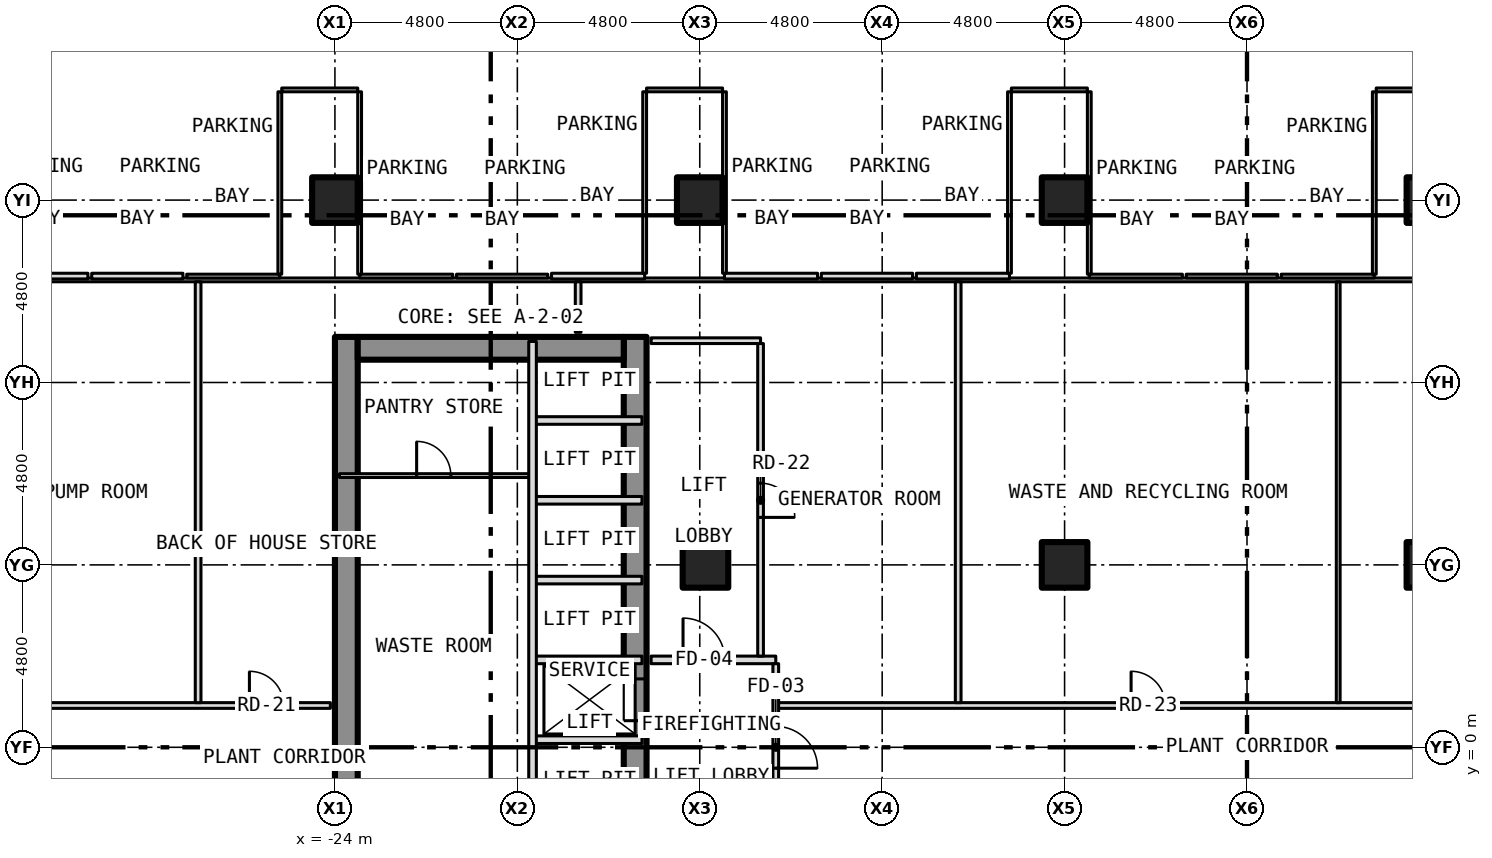
"""IFC4 building model, lengths in metres.
Left out: names, types, materials, properties, quantities, classifications, styles, units other than length and angle.
Written with IfcOpenShell. Run it as: python <this file> out.ifc"""

import sys

from ifc_helpers import new_model, si_unit, direction, frame, frame_2d, origin, origin_2d, place, context, subcontext, project, spatial, rectangle, hollow_rectangle, extrude, element, fill, save


model = new_model("IFC4")
c1 = context("Model", 3, precision=1e-05, world=origin(), true_north=direction((0.0, 1.0)))
c2 = subcontext(c1, "Body", "Model", "MODEL_VIEW")
j1 = project(units=[si_unit("LENGTHUNIT", "METRE"), si_unit("PLANEANGLEUNIT", "RADIAN")], contexts=[c1])
p1 = place(None, origin())
s1 = spatial("IfcSite", under=j1, at=p1, CompositionType="ELEMENT")
p2 = place(p1, origin())
s2 = spatial("IfcBuilding", under=s1, at=p2, CompositionType="ELEMENT")
p3 = place(p2, frame((0.0, 0.0, -5.0)))
s3 = spatial("IfcBuildingStorey", under=s2, at=p3, CompositionType="ELEMENT", Elevation=-5.0)
for number, where, z_axis, x_axis in (
    (1, (-24.0, 14.4, -0.3), (0.0, 0.0, 1.0), (1.0, 0.0, 0.0)),
    (2, (-14.25, 4.8, -0.3), (0.0, 0.0, 1.0), (1.0, 0.0, 0.0)),
    (3, (-14.4, 14.4, -0.3), (0.0, 0.0, 1.0), (1.0, 0.0, 0.0)),
    (4, (-4.8, 4.8, -0.3), (0.0, 0.0, 1.0), (1.0, 0.0, 0.0)),
    (5, (-4.8, 14.4, -0.3), (0.0, 0.0, 1.0), (1.0, 0.0, 0.0)),
    (6, (4.8, 4.8, -0.3), (0.0, 0.0, 1.0), (1.0, 0.0, 0.0)),
    (7, (4.8, 14.4, -0.3), (0.0, 0.0, 1.0), (1.0, 0.0, 0.0)),
):
    element("IfcColumn", number, at=place(p3, frame(where, z_axis=z_axis, x_axis=x_axis)), inside=s3, PredefinedType="COLUMN", context=c2, shape_type="SweptSolid", body=[
        extrude(hollow_rectangle(XDim=1.2, YDim=1.2, WallThickness=0.07, at=origin_2d()), origin(), (0.0, 0.0, 1.0), 5.0),
    ])
p4 = place(p3, frame((-16.1, -10.8, 0.0), z_axis=(0.0, 0.0, 1.0), x_axis=(0.0, 1.0, 0.0)))
e8 = element("IfcWall", 8, at=p4, inside=s3, PredefinedType="SHEAR", context=c2, shape_type="SweptSolid", body=[
    extrude(rectangle(XDim=21.6, YDim=0.6, at=frame_2d((10.8, 0.0))), origin(), (0.0, 0.0, 1.0), 4.7),
])
p5 = place(p4, frame((11.5, 0.0, 0.0)))
e9 = element("IfcOpeningElement", 9, at=p5, cuts=e8, PredefinedType="OPENING", context=c2, shape_type="SweptSolid", body=[
    extrude(rectangle(XDim=1.1, YDim=2.1, at=frame_2d((0.55, 1.05))), frame((0.0, 0.312, 0.0), z_axis=(0.0, -1.0, 0.0), x_axis=(1.0, 0.0, 0.0)), (0.0, 0.0, 1.0), 0.624),
])
p6 = place(p4, frame((0.758, 0.0, 0.0)))
e10 = element("IfcOpeningElement", 10, at=p6, cuts=e8, PredefinedType="OPENING", context=c2, shape_type="SweptSolid", body=[
    extrude(rectangle(XDim=1.1, YDim=2.1, at=frame_2d((0.55, 1.05))), frame((0.0, 0.312, 0.0), z_axis=(0.0, -1.0, 0.0), x_axis=(1.0, 0.0, 0.0)), (0.0, 0.0, 1.0), 0.624),
])
p7 = place(p4, frame((7.5, 0.0, 0.0)))
e11 = element("IfcOpeningElement", 11, at=p7, cuts=e8, PredefinedType="OPENING", context=c2, shape_type="SweptSolid", body=[
    extrude(rectangle(XDim=1.1, YDim=2.1, at=frame_2d((0.55, 1.05))), frame((0.0, 0.312, 0.0), z_axis=(0.0, -1.0, 0.0), x_axis=(1.0, 0.0, 0.0)), (0.0, 0.0, 1.0), 0.624),
])
p8 = place(p3, frame((-23.7, -10.8, 0.0), z_axis=(0.0, 0.0, 1.0), x_axis=(0.0, 1.0, 0.0)))
e12 = element("IfcWall", 12, at=p8, inside=s3, PredefinedType="SHEAR", context=c2, shape_type="SweptSolid", body=[
    extrude(rectangle(XDim=21.6, YDim=0.6, at=frame_2d((10.8, 0.0))), origin(), (0.0, 0.0, 1.0), 4.7),
])
p9 = place(p3, frame((-23.4, 10.5, 0.0), z_axis=(0.0, 0.0, 1.0), x_axis=(1.0, 0.0, 0.0)))
e13 = element("IfcWall", 13, at=p9, inside=s3, PredefinedType="SHEAR", context=c2, shape_type="SweptSolid", body=[
    extrude(rectangle(XDim=7.0, YDim=0.6, at=frame_2d((3.5, 0.0))), origin(), (0.0, 0.0, 1.0), 4.7),
])
p10 = place(p3, frame((-18.8, 0.2, 0.0), z_axis=(0.0, 0.0, 1.0), x_axis=(1.0, 0.0, 0.0)))
e14 = element("IfcWall", 14, at=p10, inside=s3, PredefinedType="PARTITIONING", context=c2, shape_type="SweptSolid", body=[
    extrude(rectangle(XDim=2.88, YDim=0.2, at=frame_2d((1.44, 0.0))), origin(), (0.0, 0.0, 1.0), 4.7),
])
p11 = place(p3, frame((-37.6, 1.1, 0.0), z_axis=(0.0, 0.0, 1.0), x_axis=(1.0, 0.0, 0.0)))
e15 = element("IfcWall", 15, at=p11, inside=s3, PredefinedType="PARTITIONING", context=c2, shape_type="SweptSolid", body=[
    extrude(rectangle(XDim=13.48, YDim=0.15, at=frame_2d((6.74, 0.0))), origin(), (0.0, 0.0, 1.0), 4.7),
])
p12 = place(p11, frame((4.55, 0.0, 0.0)))
e16 = element("IfcOpeningElement", 16, at=p12, cuts=e15, PredefinedType="OPENING", context=c2, shape_type="SweptSolid", body=[
    extrude(rectangle(XDim=0.9, YDim=2.1, at=frame_2d((0.45, 1.05))), frame((0.0, 0.087, 0.0), z_axis=(0.0, -1.0, 0.0), x_axis=(1.0, 0.0, 0.0)), (0.0, 0.0, 1.0), 0.174),
])
p13 = place(p11, frame((11.35, 0.0, 0.0)))
e17 = element("IfcOpeningElement", 17, at=p13, cuts=e15, PredefinedType="OPENING", context=c2, shape_type="SweptSolid", body=[
    extrude(rectangle(XDim=0.9, YDim=2.1, at=frame_2d((0.45, 1.05))), frame((0.0, 0.087, 0.0), z_axis=(0.0, -1.0, 0.0), x_axis=(1.0, 0.0, 0.0)), (0.0, 0.0, 1.0), 0.174),
])
p14 = place(p3, frame((-12.4, 1.1, 0.0), z_axis=(0.0, 0.0, 1.0), x_axis=(1.0, 0.0, 0.0)))
e18 = element("IfcWall", 18, at=p14, inside=s3, PredefinedType="PARTITIONING", context=c2, shape_type="SweptSolid", body=[
    extrude(rectangle(XDim=24.8, YDim=0.15, at=frame_2d((12.4, 0.0))), origin(), (0.0, 0.0, 1.0), 4.7),
])
p15 = place(p14, frame((9.35, 0.0, 0.0)))
e19 = element("IfcOpeningElement", 19, at=p15, cuts=e18, PredefinedType="OPENING", context=c2, shape_type="SweptSolid", body=[
    extrude(rectangle(XDim=0.9, YDim=2.1, at=frame_2d((0.45, 1.05))), frame((0.0, 0.087, 0.0), z_axis=(0.0, -1.0, 0.0), x_axis=(1.0, 0.0, 0.0)), (0.0, 0.0, 1.0), 0.174),
])
p16 = place(p14, frame((19.35, 0.0, 0.0)))
e20 = element("IfcOpeningElement", 20, at=p16, cuts=e18, PredefinedType="OPENING", context=c2, shape_type="SweptSolid", body=[
    extrude(rectangle(XDim=0.9, YDim=2.1, at=frame_2d((0.45, 1.05))), frame((0.0, 0.087, 0.0), z_axis=(0.0, -1.0, 0.0), x_axis=(1.0, 0.0, 0.0)), (0.0, 0.0, 1.0), 0.174),
])
p17 = place(p3, frame((-18.8, 2.3, 0.0), z_axis=(0.0, 0.0, 1.0), x_axis=(1.0, 0.0, 0.0)))
e21 = element("IfcWall", 21, at=p17, inside=s3, PredefinedType="PARTITIONING", context=c2, shape_type="SweptSolid", body=[
    extrude(rectangle(XDim=2.88, YDim=0.2, at=frame_2d((1.44, 0.0))), origin(), (0.0, 0.0, 1.0), 4.7),
])
p18 = place(p3, frame((-15.68, 2.3, 0.0), z_axis=(0.0, 0.0, 1.0), x_axis=(1.0, 0.0, 0.0)))
e22 = element("IfcWall", 22, at=p18, inside=s3, PredefinedType="PARTITIONING", context=c2, shape_type="SweptSolid", body=[
    extrude(rectangle(XDim=3.28, YDim=0.2, at=frame_2d((1.64, 0.0))), origin(), (0.0, 0.0, 1.0), 4.7),
])
p19 = place(p18, frame((0.84, 0.0, 0.0)))
e23 = element("IfcOpeningElement", 23, at=p19, cuts=e22, PredefinedType="OPENING", context=c2, shape_type="SweptSolid", body=[
    extrude(rectangle(XDim=1.1, YDim=2.1, at=frame_2d((0.55, 1.05))), frame((0.0, 0.112, 0.0), z_axis=(0.0, -1.0, 0.0), x_axis=(1.0, 0.0, 0.0)), (0.0, 0.0, 1.0), 0.224),
])
for number, where, z_axis, x_axis in (
    (24, (-18.8, 4.4, 0.0), (0.0, 0.0, 1.0), (1.0, 0.0, 0.0)),
    (25, (-18.8, 6.5, 0.0), (0.0, 0.0, 1.0), (1.0, 0.0, 0.0)),
):
    element("IfcWall", number, at=place(p3, frame(where, z_axis=z_axis, x_axis=x_axis)), inside=s3, PredefinedType="PARTITIONING", context=c2, shape_type="SweptSolid", body=[
        extrude(rectangle(XDim=2.88, YDim=0.2, at=frame_2d((1.44, 0.0))), origin(), (0.0, 0.0, 1.0), 4.7),
    ])
p20 = place(p3, frame((-23.88, 7.15, 0.0), z_axis=(0.0, 0.0, 1.0), x_axis=(1.0, 0.0, 0.0)))
e26 = element("IfcWall", 26, at=p20, inside=s3, PredefinedType="PARTITIONING", context=c2, shape_type="SweptSolid", body=[
    extrude(rectangle(XDim=5.08, YDim=0.1, at=frame_2d((2.54, 0.0))), origin(), (0.0, 0.0, 1.0), 4.7),
])
p21 = place(p20, frame((2.03, 0.0, 0.0)))
e27 = element("IfcOpeningElement", 27, at=p21, cuts=e26, PredefinedType="OPENING", context=c2, shape_type="SweptSolid", body=[
    extrude(rectangle(XDim=0.9, YDim=2.1, at=frame_2d((0.45, 1.05))), frame((0.0, 0.062, 0.0), z_axis=(0.0, -1.0, 0.0), x_axis=(1.0, 0.0, 0.0)), (0.0, 0.0, 1.0), 0.124),
])
p22 = place(p3, frame((-18.8, 8.6, 0.0), z_axis=(0.0, 0.0, 1.0), x_axis=(1.0, 0.0, 0.0)))
e28 = element("IfcWall", 28, at=p22, inside=s3, PredefinedType="PARTITIONING", context=c2, shape_type="SweptSolid", body=[
    extrude(rectangle(XDim=2.88, YDim=0.2, at=frame_2d((1.44, 0.0))), origin(), (0.0, 0.0, 1.0), 4.7),
])
p23 = place(p3, frame((-15.68, 10.7, 0.0), z_axis=(0.0, 0.0, 1.0), x_axis=(1.0, 0.0, 0.0)))
e29 = element("IfcWall", 29, at=p23, inside=s3, PredefinedType="PARTITIONING", context=c2, shape_type="SweptSolid", body=[
    extrude(rectangle(XDim=2.88, YDim=0.15, at=frame_2d((1.44, 0.0))), origin(), (0.0, 0.0, 1.0), 4.7),
])
p24 = place(p3, frame((-37.6, 12.3, 0.0), z_axis=(0.0, 0.0, 1.0), x_axis=(1.0, 0.0, 0.0)))
e30 = element("IfcWall", 30, at=p24, inside=s3, PredefinedType="PARTITIONING", context=c2, shape_type="SweptSolid", body=[
    extrude(rectangle(XDim=70.0, YDim=0.1, at=frame_2d((35.0, 0.0))), origin(), (0.0, 0.0, 1.0), 4.7),
])
p25 = place(p3, frame((-32.95, 12.4, 0.0), z_axis=(0.0, 0.0, 1.0), x_axis=(1.0, 0.0, 0.0)))
e31 = element("IfcWall", 31, at=p25, inside=s3, PredefinedType="PARTITIONING", context=c2, shape_type="SweptSolid", body=[
    extrude(rectangle(XDim=2.45, YDim=0.15, at=frame_2d((1.225, 0.0))), origin(), (0.0, 0.0, 1.0), 4.7),
])
p26 = place(p3, frame((-30.4, 12.4, 0.0), z_axis=(0.0, 0.0, 1.0), x_axis=(1.0, 0.0, 0.0)))
e32 = element("IfcWall", 32, at=p26, inside=s3, PredefinedType="PARTITIONING", context=c2, shape_type="SweptSolid", body=[
    extrude(rectangle(XDim=2.4, YDim=0.15, at=frame_2d((1.2, 0.0))), origin(), (0.0, 0.0, 1.0), 4.7),
])
p27 = place(p3, frame((-27.9, 12.4, 0.0), z_axis=(0.0, 0.0, 1.0), x_axis=(1.0, 0.0, 0.0)))
e33 = element("IfcWall", 33, at=p27, inside=s3, PredefinedType="PARTITIONING", context=c2, shape_type="SweptSolid", body=[
    extrude(rectangle(XDim=2.45, YDim=0.1, at=frame_2d((1.225, 0.0))), origin(), (0.0, 0.0, 1.0), 4.7),
])
p28 = place(p3, frame((-23.35, 12.4, 0.0), z_axis=(0.0, 0.0, 1.0), x_axis=(1.0, 0.0, 0.0)))
e34 = element("IfcWall", 34, at=p28, inside=s3, PredefinedType="PARTITIONING", context=c2, shape_type="SweptSolid", body=[
    extrude(rectangle(XDim=2.45, YDim=0.1, at=frame_2d((1.225, 0.0))), origin(), (0.0, 0.0, 1.0), 4.7),
])
p29 = place(p3, frame((-20.8, 12.4, 0.0), z_axis=(0.0, 0.0, 1.0), x_axis=(1.0, 0.0, 0.0)))
e35 = element("IfcWall", 35, at=p29, inside=s3, PredefinedType="PARTITIONING", context=c2, shape_type="SweptSolid", body=[
    extrude(rectangle(XDim=2.4, YDim=0.1, at=frame_2d((1.2, 0.0))), origin(), (0.0, 0.0, 1.0), 4.7),
])
for number, where, z_axis, x_axis in (
    (36, (-18.3, 12.4, 0.0), (0.0, 0.0, 1.0), (1.0, 0.0, 0.0)),
    (37, (-13.75, 12.4, 0.0), (0.0, 0.0, 1.0), (1.0, 0.0, 0.0)),
):
    element("IfcWall", number, at=place(p3, frame(where, z_axis=z_axis, x_axis=x_axis)), inside=s3, PredefinedType="PARTITIONING", context=c2, shape_type="SweptSolid", body=[
        extrude(rectangle(XDim=2.45, YDim=0.15, at=frame_2d((1.225, 0.0))), origin(), (0.0, 0.0, 1.0), 4.7),
    ])
p30 = place(p3, frame((-11.2, 12.4, 0.0), z_axis=(0.0, 0.0, 1.0), x_axis=(1.0, 0.0, 0.0)))
e38 = element("IfcWall", 38, at=p30, inside=s3, PredefinedType="PARTITIONING", context=c2, shape_type="SweptSolid", body=[
    extrude(rectangle(XDim=2.4, YDim=0.15, at=frame_2d((1.2, 0.0))), origin(), (0.0, 0.0, 1.0), 4.7),
])
p31 = place(p3, frame((-8.7, 12.4, 0.0), z_axis=(0.0, 0.0, 1.0), x_axis=(1.0, 0.0, 0.0)))
e39 = element("IfcWall", 39, at=p31, inside=s3, PredefinedType="PARTITIONING", context=c2, shape_type="SweptSolid", body=[
    extrude(rectangle(XDim=2.45, YDim=0.15, at=frame_2d((1.225, 0.0))), origin(), (0.0, 0.0, 1.0), 4.7),
])
p32 = place(p3, frame((-4.15, 12.4, 0.0), z_axis=(0.0, 0.0, 1.0), x_axis=(1.0, 0.0, 0.0)))
e40 = element("IfcWall", 40, at=p32, inside=s3, PredefinedType="PARTITIONING", context=c2, shape_type="SweptSolid", body=[
    extrude(rectangle(XDim=2.45, YDim=0.1, at=frame_2d((1.225, 0.0))), origin(), (0.0, 0.0, 1.0), 4.7),
])
p33 = place(p3, frame((-1.6, 12.4, 0.0), z_axis=(0.0, 0.0, 1.0), x_axis=(1.0, 0.0, 0.0)))
e41 = element("IfcWall", 41, at=p33, inside=s3, PredefinedType="PARTITIONING", context=c2, shape_type="SweptSolid", body=[
    extrude(rectangle(XDim=2.4, YDim=0.1, at=frame_2d((1.2, 0.0))), origin(), (0.0, 0.0, 1.0), 4.7),
])
p34 = place(p3, frame((0.9, 12.4, 0.0), z_axis=(0.0, 0.0, 1.0), x_axis=(1.0, 0.0, 0.0)))
e42 = element("IfcWall", 42, at=p34, inside=s3, PredefinedType="PARTITIONING", context=c2, shape_type="SweptSolid", body=[
    extrude(rectangle(XDim=2.45, YDim=0.1, at=frame_2d((1.225, 0.0))), origin(), (0.0, 0.0, 1.0), 4.7),
])
for number, where, z_axis, x_axis in (
    (43, (-25.4, 17.3, 0.0), (0.0, 0.0, 1.0), (1.0, 0.0, 0.0)),
    (44, (-15.8, 17.3, 0.0), (0.0, 0.0, 1.0), (1.0, 0.0, 0.0)),
    (45, (-6.2, 17.3, 0.0), (0.0, 0.0, 1.0), (1.0, 0.0, 0.0)),
    (46, (3.4, 17.3, 0.0), (0.0, 0.0, 1.0), (1.0, 0.0, 0.0)),
):
    element("IfcWall", number, at=place(p3, frame(where, z_axis=z_axis, x_axis=x_axis)), inside=s3, PredefinedType="PARTITIONING", context=c2, shape_type="SweptSolid", body=[
        extrude(rectangle(XDim=2.0, YDim=0.1, at=frame_2d((1.0, 0.0))), origin(), (0.0, 0.0, 1.0), 4.7),
    ])
p35 = place(p3, frame((-27.6, 1.175, 0.0), z_axis=(0.0, 0.0, 1.0), x_axis=(0.0, 1.0, 0.0)))
e47 = element("IfcWall", 47, at=p35, inside=s3, PredefinedType="PARTITIONING", context=c2, shape_type="SweptSolid", body=[
    extrude(rectangle(XDim=11.075, YDim=0.15, at=frame_2d((5.538, 0.0))), origin(), (0.0, 0.0, 1.0), 4.7),
])
for number, where, z_axis, x_axis in (
    (48, (-25.45, 12.45, 0.0), (0.0, 0.0, 1.0), (0.0, 1.0, 0.0)),
    (49, (-23.35, 12.45, 0.0), (0.0, 0.0, 1.0), (0.0, 1.0, 0.0)),
):
    element("IfcWall", number, at=place(p3, frame(where, z_axis=z_axis, x_axis=x_axis)), inside=s3, PredefinedType="PARTITIONING", context=c2, shape_type="SweptSolid", body=[
        extrude(rectangle(XDim=4.8, YDim=0.1, at=frame_2d((2.4, 0.0))), origin(), (0.0, 0.0, 1.0), 4.7),
    ])
p36 = place(p3, frame((-18.8, -1.8, 0.0), z_axis=(0.0, 0.0, 1.0), x_axis=(0.0, 1.0, 0.0)))
e50 = element("IfcWall", 50, at=p36, inside=s3, PredefinedType="PARTITIONING", context=c2, shape_type="SweptSolid", body=[
    extrude(rectangle(XDim=12.48, YDim=0.2, at=frame_2d((6.24, 0.0))), origin(), (0.0, 0.0, 1.0), 4.7),
])
p37 = place(p3, frame((-17.6, 10.92, 0.0), z_axis=(0.0, 0.0, 1.0), x_axis=(0.0, 1.0, 0.0)))
e51 = element("IfcWall", 51, at=p37, inside=s3, PredefinedType="PARTITIONING", context=c2, shape_type="SweptSolid", body=[
    extrude(rectangle(XDim=1.33, YDim=0.15, at=frame_2d((0.665, 0.0))), origin(), (0.0, 0.0, 1.0), 4.7),
])
for number, where, z_axis, x_axis in (
    (52, (-15.85, 12.475, 0.0), (0.0, 0.0, 1.0), (0.0, 1.0, 0.0)),
    (53, (-13.75, 12.475, 0.0), (0.0, 0.0, 1.0), (0.0, 1.0, 0.0)),
):
    element("IfcWall", number, at=place(p3, frame(where, z_axis=z_axis, x_axis=x_axis)), inside=s3, PredefinedType="PARTITIONING", context=c2, shape_type="SweptSolid", body=[
        extrude(rectangle(XDim=4.775, YDim=0.1, at=frame_2d((2.387, 0.0))), origin(), (0.0, 0.0, 1.0), 4.7),
    ])
p38 = place(p3, frame((-12.8, 2.4, 0.0), z_axis=(0.0, 0.0, 1.0), x_axis=(0.0, 1.0, 0.0)))
e54 = element("IfcWall", 54, at=p38, inside=s3, PredefinedType="PARTITIONING", context=c2, shape_type="SweptSolid", body=[
    extrude(rectangle(XDim=8.225, YDim=0.15, at=frame_2d((4.113, 0.0))), origin(), (0.0, 0.0, 1.0), 4.7),
])
p39 = place(p38, frame((3.65, 0.0, 0.0)))
e55 = element("IfcOpeningElement", 55, at=p39, cuts=e54, PredefinedType="OPENING", context=c2, shape_type="SweptSolid", body=[
    extrude(rectangle(XDim=0.9, YDim=2.1, at=frame_2d((0.45, 1.05))), frame((0.0, 0.087, 0.0), z_axis=(0.0, -1.0, 0.0), x_axis=(1.0, 0.0, 0.0)), (0.0, 0.0, 1.0), 0.174),
])
p40 = place(p3, frame((-12.4, -10.725, 0.0), z_axis=(0.0, 0.0, 1.0), x_axis=(0.0, 1.0, 0.0)))
e56 = element("IfcWall", 56, at=p40, inside=s3, PredefinedType="PARTITIONING", context=c2, shape_type="SweptSolid", body=[
    extrude(rectangle(XDim=12.925, YDim=0.15, at=frame_2d((6.462, 0.0))), origin(), (0.0, 0.0, 1.0), 4.7),
])
p41 = place(p40, frame((10.175, 0.0, 0.0)))
e57 = element("IfcOpeningElement", 57, at=p41, cuts=e56, PredefinedType="OPENING", context=c2, shape_type="SweptSolid", body=[
    extrude(rectangle(XDim=1.1, YDim=2.1, at=frame_2d((0.55, 1.05))), frame((0.0, 0.087, 0.0), z_axis=(0.0, -1.0, 0.0), x_axis=(1.0, 0.0, 0.0)), (0.0, 0.0, 1.0), 0.174),
])
p42 = place(p3, frame((-7.6, 1.175, 0.0), z_axis=(0.0, 0.0, 1.0), x_axis=(0.0, 1.0, 0.0)))
e58 = element("IfcWall", 58, at=p42, inside=s3, PredefinedType="PARTITIONING", context=c2, shape_type="SweptSolid", body=[
    extrude(rectangle(XDim=11.075, YDim=0.15, at=frame_2d((5.538, 0.0))), origin(), (0.0, 0.0, 1.0), 4.7),
])
p43 = place(p3, frame((-6.25, 12.475, 0.0), z_axis=(0.0, 0.0, 1.0), x_axis=(0.0, 1.0, 0.0)))
e59 = element("IfcWall", 59, at=p43, inside=s3, PredefinedType="PARTITIONING", context=c2, shape_type="SweptSolid", body=[
    extrude(rectangle(XDim=4.775, YDim=0.1, at=frame_2d((2.387, 0.0))), origin(), (0.0, 0.0, 1.0), 4.7),
])
p44 = place(p3, frame((-4.15, 12.45, 0.0), z_axis=(0.0, 0.0, 1.0), x_axis=(0.0, 1.0, 0.0)))
e60 = element("IfcWall", 60, at=p44, inside=s3, PredefinedType="PARTITIONING", context=c2, shape_type="SweptSolid", body=[
    extrude(rectangle(XDim=4.8, YDim=0.1, at=frame_2d((2.4, 0.0))), origin(), (0.0, 0.0, 1.0), 4.7),
])
p45 = place(p3, frame((2.4, 1.175, 0.0), z_axis=(0.0, 0.0, 1.0), x_axis=(0.0, 1.0, 0.0)))
e61 = element("IfcWall", 61, at=p45, inside=s3, PredefinedType="PARTITIONING", context=c2, shape_type="SweptSolid", body=[
    extrude(rectangle(XDim=11.075, YDim=0.1, at=frame_2d((5.538, 0.0))), origin(), (0.0, 0.0, 1.0), 4.7),
])
p46 = place(p3, frame((3.35, 12.45, 0.0), z_axis=(0.0, 0.0, 1.0), x_axis=(0.0, 1.0, 0.0)))
e62 = element("IfcWall", 62, at=p46, inside=s3, PredefinedType="PARTITIONING", context=c2, shape_type="SweptSolid", body=[
    extrude(rectangle(XDim=4.8, YDim=0.1, at=frame_2d((2.4, 0.0))), origin(), (0.0, 0.0, 1.0), 4.7),
])
p47 = place(p5, origin())
e63 = element("IfcDoor", 63, at=p47, inside=s3, OperationType="SLIDING_TO_LEFT", PredefinedType="DOOR", context=c2, shape_type="SweptSolid", body=[
    extrude(rectangle(XDim=1.1, YDim=2.1, at=frame_2d((0.55, 1.05))), frame((0.0, 0.025, 0.0), z_axis=(0.0, -1.0, 0.0), x_axis=(1.0, 0.0, 0.0)), (0.0, 0.0, 1.0), 0.05),
])
fill(e9, e63)
p48 = place(p21, origin())
e64 = element("IfcDoor", 64, at=p48, inside=s3, OperationType="SINGLE_SWING_LEFT", PredefinedType="DOOR", context=c2, shape_type="SweptSolid", body=[
    extrude(rectangle(XDim=0.9, YDim=2.1, at=frame_2d((0.45, 1.05))), frame((0.0, 0.025, 0.0), z_axis=(0.0, -1.0, 0.0), x_axis=(1.0, 0.0, 0.0)), (0.0, 0.0, 1.0), 0.05),
])
fill(e27, e64)
p49 = place(p41, origin())
e65 = element("IfcDoor", 65, at=p49, inside=s3, OperationType="SINGLE_SWING_LEFT", PredefinedType="DOOR", context=c2, shape_type="SweptSolid", body=[
    extrude(rectangle(XDim=1.1, YDim=2.1, at=frame_2d((0.55, 1.05))), frame((0.0, 0.025, 0.0), z_axis=(0.0, -1.0, 0.0), x_axis=(1.0, 0.0, 0.0)), (0.0, 0.0, 1.0), 0.05),
])
fill(e57, e65)
p50 = place(p19, origin())
e66 = element("IfcDoor", 66, at=p50, inside=s3, OperationType="SINGLE_SWING_LEFT", PredefinedType="DOOR", context=c2, shape_type="SweptSolid", body=[
    extrude(rectangle(XDim=1.1, YDim=2.1, at=frame_2d((0.55, 1.05))), frame((0.0, 0.025, 0.0), z_axis=(0.0, -1.0, 0.0), x_axis=(1.0, 0.0, 0.0)), (0.0, 0.0, 1.0), 0.05),
])
fill(e23, e66)
p51 = place(p13, origin())
e67 = element("IfcDoor", 67, at=p51, inside=s3, OperationType="SINGLE_SWING_LEFT", PredefinedType="DOOR", context=c2, shape_type="SweptSolid", body=[
    extrude(rectangle(XDim=0.9, YDim=2.1, at=frame_2d((0.45, 1.05))), frame((0.0, 0.025, 0.0), z_axis=(0.0, -1.0, 0.0), x_axis=(1.0, 0.0, 0.0)), (0.0, 0.0, 1.0), 0.05),
])
fill(e17, e67)
p52 = place(p39, origin())
e68 = element("IfcDoor", 68, at=p52, inside=s3, OperationType="SINGLE_SWING_LEFT", PredefinedType="DOOR", context=c2, shape_type="SweptSolid", body=[
    extrude(rectangle(XDim=0.9, YDim=2.1, at=frame_2d((0.45, 1.05))), frame((0.0, 0.025, 0.0), z_axis=(0.0, -1.0, 0.0), x_axis=(1.0, 0.0, 0.0)), (0.0, 0.0, 1.0), 0.05),
])
fill(e55, e68)
p53 = place(p15, origin())
e69 = element("IfcDoor", 69, at=p53, inside=s3, OperationType="SINGLE_SWING_LEFT", PredefinedType="DOOR", context=c2, shape_type="SweptSolid", body=[
    extrude(rectangle(XDim=0.9, YDim=2.1, at=frame_2d((0.45, 1.05))), frame((0.0, 0.025, 0.0), z_axis=(0.0, -1.0, 0.0), x_axis=(1.0, 0.0, 0.0)), (0.0, 0.0, 1.0), 0.05),
])
fill(e19, e69)
save(model, sys.argv[1])
